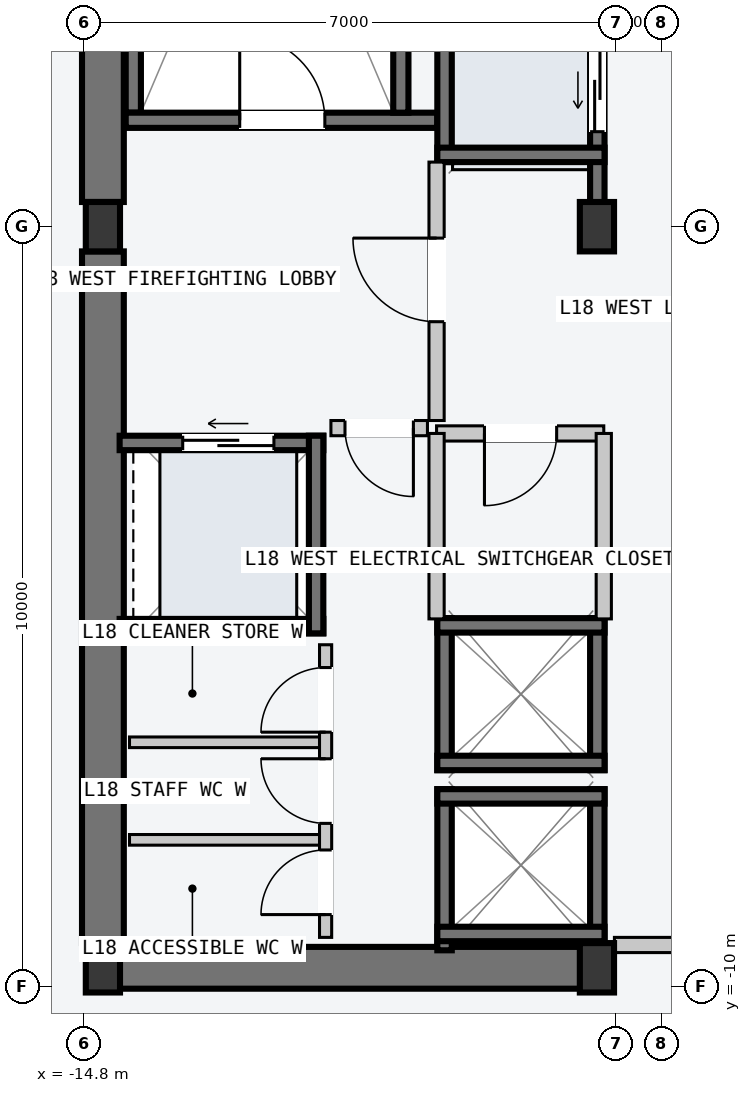
"""IFC4 building model, lengths in metres.
Left out: names, types, materials, properties, quantities, classifications, styles, units other than length and angle.
Written with IfcOpenShell. Run it as: python <this file> out.ifc"""

import sys

from ifc_helpers import new_model, si_unit, direction, frame, frame_2d, origin, origin_2d, place, context, subcontext, project, spatial, rectangle, i_section, extrude, element, fill, save


model = new_model("IFC4")
c1 = context("Model", 3, precision=1e-05, world=origin(), true_north=direction((0.0, 1.0)))
c2 = subcontext(c1, "Body", "Model", "MODEL_VIEW")
j1 = project(units=[si_unit("LENGTHUNIT", "METRE"), si_unit("PLANEANGLEUNIT", "RADIAN")], contexts=[c1])
p1 = place(None, origin())
s1 = spatial("IfcSite", under=j1, at=p1, CompositionType="ELEMENT")
p2 = place(p1, origin())
s2 = spatial("IfcBuilding", under=s1, at=p2, CompositionType="ELEMENT")
p3 = place(p2, frame((0.0, 0.0, 70.8)))
s3 = spatial("IfcBuildingStorey", under=s2, at=p3, CompositionType="ELEMENT", Elevation=70.8)
p4 = place(p3, frame((-14.53, -9.75, -0.2), z_axis=(0.0, 0.0, 1.0), x_axis=(1.0, 0.0, 0.0)))
e1 = element("IfcWall", 1, at=p4, inside=s3, PredefinedType="SHEAR", context=c2, shape_type="SweptSolid", body=[
    extrude(rectangle(XDim=6.46, YDim=0.55, at=frame_2d((3.23, 0.0))), origin(), (0.0, 0.0, 1.0), 3.6),
])
for number, where, z_axis, x_axis in (
    (2, (-14.55, -9.425, -0.2), (0.0, 0.0, 1.0), (0.0, 1.0, 0.0)),
    (3, (-14.55, 0.325, -0.2), (0.0, 0.0, 1.0), (0.0, 1.0, 0.0)),
):
    element("IfcWall", number, at=place(p3, frame(where, z_axis=z_axis, x_axis=x_axis)), inside=s3, PredefinedType="SHEAR", context=c2, shape_type="SweptSolid", body=[
        extrude(rectangle(XDim=9.1, YDim=0.55, at=frame_2d((4.55, 0.0))), origin(), (0.0, 0.0, 1.0), 3.6),
    ])
p5 = place(p3, frame((-14.15, 1.5, -0.2), z_axis=(0.0, 0.0, 1.0), x_axis=(0.0, 1.0, 0.0)))
e4 = element("IfcWall", 4, at=p5, inside=s3, PredefinedType="SOLIDWALL", context=c2, shape_type="SweptSolid", body=[
    extrude(rectangle(XDim=7.8, YDim=0.2, at=frame_2d((3.9, 0.0))), origin(), (0.0, 0.0, 1.0), 3.6),
])
p6 = place(p3, frame((-14.25, 1.4, -0.2), z_axis=(0.0, 0.0, 1.0), x_axis=(1.0, 0.0, 0.0)))
e5 = element("IfcWall", 5, at=p6, inside=s3, PredefinedType="SOLIDWALL", context=c2, shape_type="SweptSolid", body=[
    extrude(rectangle(XDim=4.1, YDim=0.2, at=frame_2d((2.05, 0.0))), origin(), (0.0, 0.0, 1.0), 3.6),
])
p7 = place(p6, frame((1.5, 0.0, 0.2)))
e6 = element("IfcOpeningElement", 6, at=p7, cuts=e5, PredefinedType="OPENING", context=c2, shape_type="SweptSolid", body=[
    extrude(rectangle(XDim=1.12, YDim=2.18, at=frame_2d((0.56, 1.09))), frame((0.0, 0.11, 0.0), z_axis=(0.0, -1.0, 0.0), x_axis=(1.0, 0.0, 0.0)), (0.0, 0.0, 1.0), 0.22),
])
p8 = place(p3, frame((-10.63, 1.5, -0.2), z_axis=(0.0, 0.0, 1.0), x_axis=(0.0, 1.0, 0.0)))
e7 = element("IfcWall", 7, at=p8, inside=s3, PredefinedType="SOLIDWALL", context=c2, shape_type="SweptSolid", body=[
    extrude(rectangle(XDim=7.8, YDim=0.2, at=frame_2d((3.9, 0.0))), origin(), (0.0, 0.0, 1.0), 3.6),
])
for number, where, z_axis, x_axis in (
    (8, (-14.55, -9.75, 0.0), (0.0, 0.0, 1.0), (1.0, 0.0, 0.0)),
    (9, (-14.55, 0.0, 0.0), (0.0, 0.0, 1.0), (1.0, 0.0, 0.0)),
    (10, (-8.05, -9.75, 0.0), (0.0, 0.0, 1.0), (1.0, 0.0, 0.0)),
    (11, (-8.05, 0.0, 0.0), (0.0, 0.0, 1.0), (1.0, 0.0, 0.0)),
):
    element("IfcColumn", number, at=place(p3, frame(where, z_axis=z_axis, x_axis=x_axis)), inside=s3, PredefinedType="COLUMN", context=c2, shape_type="SweptSolid", body=[
        extrude(i_section(OverallWidth=0.45, OverallDepth=0.65, WebThickness=0.025, FlangeThickness=0.04, at=origin_2d()), origin(), (0.0, 0.0, 1.0), 3.6),
    ])
p9 = place(p3, frame((-8.045, 0.21, -0.2), z_axis=(0.0, 0.0, 1.0), x_axis=(0.0, 1.0, 0.0)))
e12 = element("IfcWall", 12, at=p9, inside=s3, PredefinedType="SOLIDWALL", context=c2, shape_type="SweptSolid", body=[
    extrude(rectangle(XDim=2.54, YDim=0.19, at=frame_2d((1.27, 0.0))), origin(), (0.0, 0.0, 1.0), 3.6),
])
p10 = place(p9, frame((1.04, 0.0, 0.2)))
e13 = element("IfcOpeningElement", 13, at=p10, cuts=e12, PredefinedType="OPENING", context=c2, shape_type="SweptSolid", body=[
    extrude(rectangle(XDim=1.1, YDim=2.2, at=frame_2d((0.55, 1.1))), frame((0.0, 0.105, 0.0), z_axis=(0.0, -1.0, 0.0), x_axis=(1.0, 0.0, 0.0)), (0.0, 0.0, 1.0), 0.21),
])
p11 = place(p3, frame((-10.055, 0.85, -0.2), z_axis=(0.0, 0.0, 1.0), x_axis=(0.0, 1.0, 0.0)))
e14 = element("IfcWall", 14, at=p11, inside=s3, PredefinedType="SOLIDWALL", context=c2, shape_type="SweptSolid", body=[
    extrude(rectangle(XDim=1.9, YDim=0.19, at=frame_2d((0.95, 0.0))), origin(), (0.0, 0.0, 1.0), 3.6),
])
p12 = place(p3, frame((-10.15, 0.945, -0.2), z_axis=(0.0, 0.0, 1.0), x_axis=(1.0, 0.0, 0.0)))
e15 = element("IfcWall", 15, at=p12, inside=s3, PredefinedType="SOLIDWALL", context=c2, shape_type="SweptSolid", body=[
    extrude(rectangle(XDim=2.2, YDim=0.19, at=frame_2d((1.1, 0.0))), origin(), (0.0, 0.0, 1.0), 3.6),
])
for number, where, z_axis, x_axis in (
    (16, (-8.045, -9.52, -0.2), (0.0, 0.0, 1.0), (0.0, 1.0, 0.0)),
    (17, (-10.055, -9.52, -0.2), (0.0, 0.0, 1.0), (0.0, 1.0, 0.0)),
):
    element("IfcWall", number, at=place(p3, frame(where, z_axis=z_axis, x_axis=x_axis)), inside=s3, PredefinedType="SOLIDWALL", context=c2, shape_type="SweptSolid", body=[
        extrude(rectangle(XDim=2.12, YDim=0.19, at=frame_2d((1.06, 0.0))), origin(), (0.0, 0.0, 1.0), 3.6),
    ])
for number, where, z_axis, x_axis in (
    (18, (-10.15, -7.495, -0.2), (0.0, 0.0, 1.0), (1.0, 0.0, 0.0)),
    (19, (-10.15, -9.305, -0.2), (0.0, 0.0, 1.0), (1.0, 0.0, 0.0)),
):
    element("IfcWall", number, at=place(p3, frame(where, z_axis=z_axis, x_axis=x_axis)), inside=s3, PredefinedType="SOLIDWALL", context=c2, shape_type="SweptSolid", body=[
        extrude(rectangle(XDim=2.2, YDim=0.19, at=frame_2d((1.1, 0.0))), origin(), (0.0, 0.0, 1.0), 3.6),
    ])
for number, where, z_axis, x_axis in (
    (20, (-8.045, -7.15, -0.2), (0.0, 0.0, 1.0), (0.0, 1.0, 0.0)),
    (21, (-10.055, -7.15, -0.2), (0.0, 0.0, 1.0), (0.0, 1.0, 0.0)),
):
    element("IfcWall", number, at=place(p3, frame(where, z_axis=z_axis, x_axis=x_axis)), inside=s3, PredefinedType="SOLIDWALL", context=c2, shape_type="SweptSolid", body=[
        extrude(rectangle(XDim=2.0, YDim=0.19, at=frame_2d((1.0, 0.0))), origin(), (0.0, 0.0, 1.0), 3.6),
    ])
for number, where, z_axis, x_axis in (
    (22, (-10.15, -5.245, -0.2), (0.0, 0.0, 1.0), (1.0, 0.0, 0.0)),
    (23, (-10.15, -7.055, -0.2), (0.0, 0.0, 1.0), (1.0, 0.0, 0.0)),
):
    element("IfcWall", number, at=place(p3, frame(where, z_axis=z_axis, x_axis=x_axis)), inside=s3, PredefinedType="SOLIDWALL", context=c2, shape_type="SweptSolid", body=[
        extrude(rectangle(XDim=2.2, YDim=0.19, at=frame_2d((1.1, 0.0))), origin(), (0.0, 0.0, 1.0), 3.6),
    ])
p13 = place(p3, frame((-14.33, -2.845, -0.2), z_axis=(0.0, 0.0, 1.0), x_axis=(1.0, 0.0, 0.0)))
e24 = element("IfcWall", 24, at=p13, inside=s3, PredefinedType="SOLIDWALL", context=c2, shape_type="SweptSolid", body=[
    extrude(rectangle(XDim=2.68, YDim=0.19, at=frame_2d((1.34, 0.0))), origin(), (0.0, 0.0, 1.0), 3.6),
])
p14 = place(p13, frame((0.83, 0.0, 0.2)))
e25 = element("IfcOpeningElement", 25, at=p14, cuts=e24, PredefinedType="OPENING", context=c2, shape_type="SweptSolid", body=[
    extrude(rectangle(XDim=1.2, YDim=2.2, at=frame_2d((0.6, 1.1))), frame((0.0, 0.105, 0.0), z_axis=(0.0, -1.0, 0.0), x_axis=(1.0, 0.0, 0.0)), (0.0, 0.0, 1.0), 0.21),
])
p15 = place(p3, frame((-14.33, -5.255, -0.2), z_axis=(0.0, 0.0, 1.0), x_axis=(1.0, 0.0, 0.0)))
e26 = element("IfcWall", 26, at=p15, inside=s3, PredefinedType="SOLIDWALL", context=c2, shape_type="SweptSolid", body=[
    extrude(rectangle(XDim=2.68, YDim=0.19, at=frame_2d((1.34, 0.0))), origin(), (0.0, 0.0, 1.0), 3.6),
])
p16 = place(p3, frame((-11.745, -5.35, -0.2), z_axis=(0.0, 0.0, 1.0), x_axis=(0.0, 1.0, 0.0)))
e27 = element("IfcWall", 27, at=p16, inside=s3, PredefinedType="SOLIDWALL", context=c2, shape_type="SweptSolid", body=[
    extrude(rectangle(XDim=2.6, YDim=0.19, at=frame_2d((1.3, 0.0))), origin(), (0.0, 0.0, 1.0), 3.6),
])
p17 = place(p3, frame((-6.02, -9.45, 0.0), z_axis=(0.0, 0.0, 1.0), x_axis=(-1.0, 0.0, 0.0)))
e28 = element("IfcWall", 28, at=p17, inside=s3, PredefinedType="PARTITIONING", context=c2, shape_type="SweptSolid", body=[
    extrude(rectangle(XDim=1.8, YDim=0.2, at=frame_2d((0.9, 0.0))), origin(), (0.0, 0.0, 1.0), 3.4),
])
p18 = place(p3, frame((-10.16, -2.55, 0.0), z_axis=(0.0, 0.0, 1.0), x_axis=(0.0, 1.0, 0.0)))
e29 = element("IfcWall", 29, at=p18, inside=s3, PredefinedType="PARTITIONING", context=c2, shape_type="SweptSolid", body=[
    extrude(rectangle(XDim=3.4, YDim=0.2, at=frame_2d((1.7, 0.0))), origin(), (0.0, 0.0, 1.0), 3.4),
])
p19 = place(p18, frame((1.3, 0.0, 0.0)))
e30 = element("IfcOpeningElement", 30, at=p19, cuts=e29, PredefinedType="OPENING", context=c2, shape_type="SweptSolid", body=[
    extrude(rectangle(XDim=1.1, YDim=2.15, at=frame_2d((0.55, 1.075))), frame((0.0, 0.11, 0.0), z_axis=(0.0, -1.0, 0.0), x_axis=(1.0, 0.0, 0.0)), (0.0, 0.0, 1.0), 0.22),
])
p20 = place(p3, frame((-10.28, -2.65, 0.0), z_axis=(0.0, 0.0, 1.0), x_axis=(-1.0, 0.0, 0.0)))
e31 = element("IfcWall", 31, at=p20, inside=s3, PredefinedType="PARTITIONING", context=c2, shape_type="SweptSolid", body=[
    extrude(rectangle(XDim=1.27, YDim=0.2, at=frame_2d((0.635, 0.0))), origin(), (0.0, 0.0, 1.0), 3.4),
])
p21 = place(p20, frame((0.185, 0.0, 0.0)))
e32 = element("IfcOpeningElement", 32, at=p21, cuts=e31, PredefinedType="OPENING", context=c2, shape_type="SweptSolid", body=[
    extrude(rectangle(XDim=0.9, YDim=2.15, at=frame_2d((0.45, 1.075))), frame((0.0, 0.11, 0.0), z_axis=(0.0, -1.0, 0.0), x_axis=(1.0, 0.0, 0.0)), (0.0, 0.0, 1.0), 0.22),
])
p22 = place(p3, frame((-7.96, -2.72, 0.0), z_axis=(0.0, 0.0, 1.0), x_axis=(-1.0, 0.0, 0.0)))
e33 = element("IfcWall", 33, at=p22, inside=s3, PredefinedType="PARTITIONING", context=c2, shape_type="SweptSolid", body=[
    extrude(rectangle(XDim=2.2, YDim=0.2, at=frame_2d((1.1, 0.0))), origin(), (0.0, 0.0, 1.0), 3.4),
])
p23 = place(p22, frame((0.62, 0.0, 0.0)))
e34 = element("IfcOpeningElement", 34, at=p23, cuts=e33, PredefinedType="OPENING", context=c2, shape_type="SweptSolid", body=[
    extrude(rectangle(XDim=0.95, YDim=2.1, at=frame_2d((0.475, 1.05))), frame((0.0, 0.11, 0.0), z_axis=(0.0, -1.0, 0.0), x_axis=(1.0, 0.0, 0.0)), (0.0, 0.0, 1.0), 0.22),
])
for number, where, z_axis, x_axis in (
    (35, (-7.96, -5.16, 0.0), (0.0, 0.0, 1.0), (0.0, 1.0, 0.0)),
    (36, (-10.16, -5.16, 0.0), (0.0, 0.0, 1.0), (0.0, 1.0, 0.0)),
):
    element("IfcWall", number, at=place(p3, frame(where, z_axis=z_axis, x_axis=x_axis)), inside=s3, PredefinedType="PARTITIONING", context=c2, shape_type="SweptSolid", body=[
        extrude(rectangle(XDim=2.44, YDim=0.2, at=frame_2d((1.22, 0.0))), origin(), (0.0, 0.0, 1.0), 3.4),
    ])
for number, where, z_axis, x_axis in (
    (37, (-11.7, -8.067, 0.0), (0.0, 0.0, 1.0), (-1.0, 0.0, 0.0)),
    (38, (-11.7, -6.783, 0.0), (0.0, 0.0, 1.0), (-1.0, 0.0, 0.0)),
):
    element("IfcWall", number, at=place(p3, frame(where, z_axis=z_axis, x_axis=x_axis)), inside=s3, PredefinedType="PARTITIONING", context=c2, shape_type="SweptSolid", body=[
        extrude(rectangle(XDim=2.5, YDim=0.14, at=frame_2d((1.25, 0.0))), origin(), (0.0, 0.0, 1.0), 3.4),
    ])
p24 = place(p3, frame((-11.62, -9.35, 0.0), z_axis=(0.0, 0.0, 1.0), x_axis=(0.0, 1.0, 0.0)))
e39 = element("IfcWall", 39, at=p24, inside=s3, PredefinedType="PARTITIONING", context=c2, shape_type="SweptSolid", body=[
    extrude(rectangle(XDim=3.85, YDim=0.16, at=frame_2d((1.925, 0.0))), origin(), (0.0, 0.0, 1.0), 3.4),
])
p25 = place(p24, frame((0.3, 0.0, 0.0)))
e40 = element("IfcOpeningElement", 40, at=p25, cuts=e39, PredefinedType="OPENING", context=c2, shape_type="SweptSolid", body=[
    extrude(rectangle(XDim=0.85, YDim=2.12, at=frame_2d((0.425, 1.06))), frame((0.0, 0.09, 0.0), z_axis=(0.0, -1.0, 0.0), x_axis=(1.0, 0.0, 0.0)), (0.0, 0.0, 1.0), 0.18),
])
p26 = place(p24, frame((1.5, 0.0, 0.0)))
e41 = element("IfcOpeningElement", 41, at=p26, cuts=e39, PredefinedType="OPENING", context=c2, shape_type="SweptSolid", body=[
    extrude(rectangle(XDim=0.85, YDim=2.12, at=frame_2d((0.425, 1.06))), frame((0.0, 0.09, 0.0), z_axis=(0.0, -1.0, 0.0), x_axis=(1.0, 0.0, 0.0)), (0.0, 0.0, 1.0), 0.18),
])
p27 = place(p24, frame((2.7, 0.0, 0.0)))
e42 = element("IfcOpeningElement", 42, at=p27, cuts=e39, PredefinedType="OPENING", context=c2, shape_type="SweptSolid", body=[
    extrude(rectangle(XDim=0.85, YDim=2.12, at=frame_2d((0.425, 1.06))), frame((0.0, 0.09, 0.0), z_axis=(0.0, -1.0, 0.0), x_axis=(1.0, 0.0, 0.0)), (0.0, 0.0, 1.0), 0.18),
])
p28 = place(p7, origin())
e43 = element("IfcDoor", 43, at=p28, inside=s3, OperationType="SINGLE_SWING_LEFT", PredefinedType="DOOR", context=c2, shape_type="SweptSolid", body=[
    extrude(rectangle(XDim=1.12, YDim=2.18, at=frame_2d((0.56, 1.09))), frame((0.0, 0.025, 0.0), z_axis=(0.0, -1.0, 0.0), x_axis=(1.0, 0.0, 0.0)), (0.0, 0.0, 1.0), 0.05),
])
fill(e6, e43)
p29 = place(p10, origin())
e44 = element("IfcDoor", 44, at=p29, inside=s3, OperationType="SLIDING_TO_LEFT", PredefinedType="DOOR", context=c2, shape_type="SweptSolid", body=[
    extrude(rectangle(XDim=1.1, YDim=2.2, at=frame_2d((0.55, 1.1))), frame((0.0, 0.025, 0.0), z_axis=(0.0, -1.0, 0.0), x_axis=(1.0, 0.0, 0.0)), (0.0, 0.0, 1.0), 0.05),
])
fill(e13, e44)
p30 = place(p14, origin())
e45 = element("IfcDoor", 45, at=p30, inside=s3, OperationType="SLIDING_TO_LEFT", PredefinedType="DOOR", context=c2, shape_type="SweptSolid", body=[
    extrude(rectangle(XDim=1.2, YDim=2.2, at=frame_2d((0.6, 1.1))), frame((0.0, 0.025, 0.0), z_axis=(0.0, -1.0, 0.0), x_axis=(1.0, 0.0, 0.0)), (0.0, 0.0, 1.0), 0.05),
])
fill(e25, e45)
p31 = place(p19, origin())
e46 = element("IfcDoor", 46, at=p31, inside=s3, OperationType="SINGLE_SWING_RIGHT", PredefinedType="DOOR", context=c2, shape_type="SweptSolid", body=[
    extrude(rectangle(XDim=1.1, YDim=2.15, at=frame_2d((0.55, 1.075))), frame((0.0, 0.025, 0.0), z_axis=(0.0, -1.0, 0.0), x_axis=(1.0, 0.0, 0.0)), (0.0, 0.0, 1.0), 0.05),
])
fill(e30, e46)
p32 = place(p21, origin())
e47 = element("IfcDoor", 47, at=p32, inside=s3, OperationType="SINGLE_SWING_LEFT", PredefinedType="DOOR", context=c2, shape_type="SweptSolid", body=[
    extrude(rectangle(XDim=0.9, YDim=2.15, at=frame_2d((0.45, 1.075))), frame((0.0, 0.025, 0.0), z_axis=(0.0, -1.0, 0.0), x_axis=(1.0, 0.0, 0.0)), (0.0, 0.0, 1.0), 0.05),
])
fill(e32, e47)
p33 = place(p23, origin())
e48 = element("IfcDoor", 48, at=p33, inside=s3, OperationType="SINGLE_SWING_RIGHT", PredefinedType="DOOR", context=c2, shape_type="SweptSolid", body=[
    extrude(rectangle(XDim=0.95, YDim=2.1, at=frame_2d((0.475, 1.05))), frame((0.0, 0.025, 0.0), z_axis=(0.0, -1.0, 0.0), x_axis=(1.0, 0.0, 0.0)), (0.0, 0.0, 1.0), 0.05),
])
fill(e34, e48)
p34 = place(p25, origin())
e49 = element("IfcDoor", 49, at=p34, inside=s3, OperationType="SINGLE_SWING_LEFT", PredefinedType="DOOR", context=c2, shape_type="SweptSolid", body=[
    extrude(rectangle(XDim=0.85, YDim=2.12, at=frame_2d((0.425, 1.06))), frame((0.0, 0.025, 0.0), z_axis=(0.0, -1.0, 0.0), x_axis=(1.0, 0.0, 0.0)), (0.0, 0.0, 1.0), 0.05),
])
fill(e40, e49)
p35 = place(p26, origin())
e50 = element("IfcDoor", 50, at=p35, inside=s3, OperationType="SINGLE_SWING_RIGHT", PredefinedType="DOOR", context=c2, shape_type="SweptSolid", body=[
    extrude(rectangle(XDim=0.85, YDim=2.12, at=frame_2d((0.425, 1.06))), frame((0.0, 0.025, 0.0), z_axis=(0.0, -1.0, 0.0), x_axis=(1.0, 0.0, 0.0)), (0.0, 0.0, 1.0), 0.05),
])
fill(e41, e50)
p36 = place(p27, origin())
e51 = element("IfcDoor", 51, at=p36, inside=s3, OperationType="SINGLE_SWING_LEFT", PredefinedType="DOOR", context=c2, shape_type="SweptSolid", body=[
    extrude(rectangle(XDim=0.85, YDim=2.12, at=frame_2d((0.425, 1.06))), frame((0.0, 0.025, 0.0), z_axis=(0.0, -1.0, 0.0), x_axis=(1.0, 0.0, 0.0)), (0.0, 0.0, 1.0), 0.05),
])
fill(e42, e51)
save(model, sys.argv[1])
